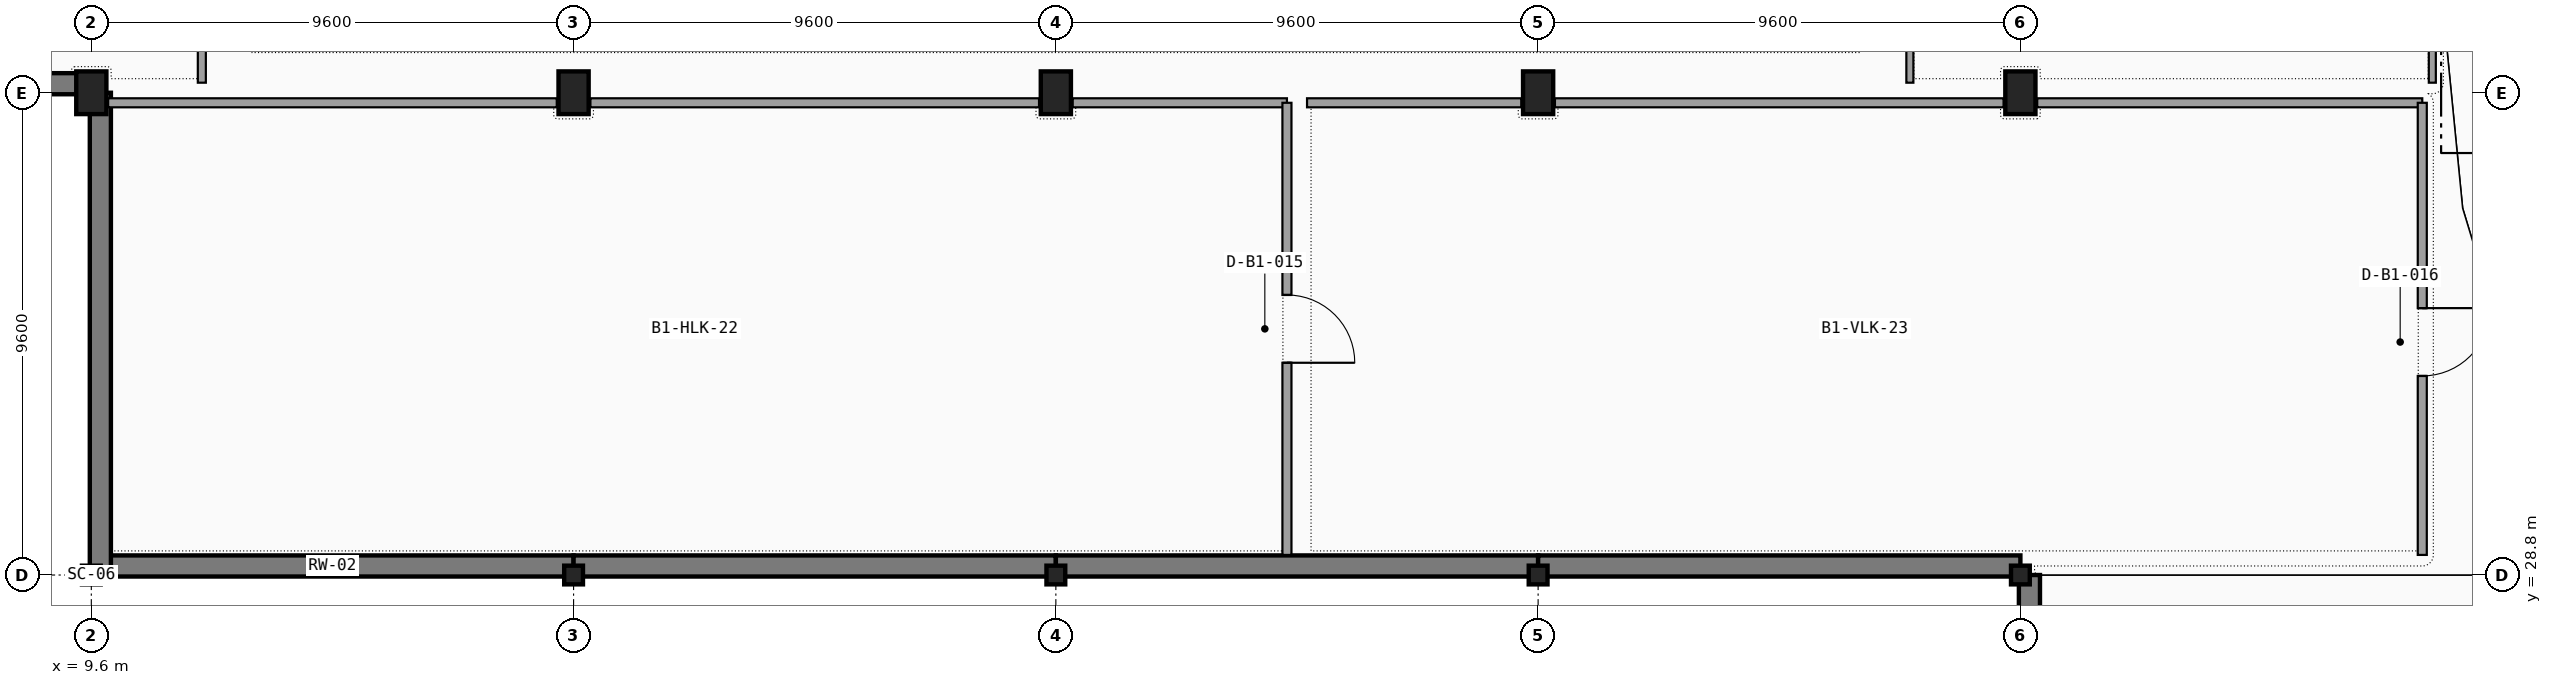
"""IFC4 building model, lengths in metres.
Left out: names, types, materials, properties, quantities, classifications, styles, units other than length and angle.
Written with IfcOpenShell. Run it as: python <this file> out.ifc"""

import sys

from ifc_helpers import new_model, si_unit, direction, frame, frame_2d, origin, origin_2d, place, context, subcontext, project, spatial, rectangle, i_section, extrude, element, fill, save


model = new_model("IFC4")
c1 = context("Model", 3, precision=1e-05, world=origin(), true_north=direction((0.0, 1.0)))
c2 = subcontext(c1, "Body", "Model", "MODEL_VIEW")
j1 = project(units=[si_unit("LENGTHUNIT", "METRE"), si_unit("PLANEANGLEUNIT", "RADIAN")], contexts=[c1])
p1 = place(None, origin())
s1 = spatial("IfcSite", under=j1, at=p1, CompositionType="ELEMENT")
p2 = place(p1, origin())
s2 = spatial("IfcBuilding", under=s1, at=p2, CompositionType="ELEMENT")
p3 = place(p2, frame((0.0, 0.0, -4.8)))
s3 = spatial("IfcBuildingStorey", under=s2, at=p3, CompositionType="ELEMENT", Elevation=-4.8)
p4 = place(p3, frame((9.6, 28.8, 0.0), z_axis=(0.0, 0.0, 1.0), x_axis=(1.0, 0.0, 0.0)))
e1 = element("IfcColumn", 1, at=p4, inside=s3, PredefinedType="COLUMN", context=c2, shape_type="SweptSolid", body=[
    extrude(i_section(OverallWidth=0.374, OverallDepth=0.372, WebThickness=0.016, FlangeThickness=0.026, FilletRadius=0.015, at=origin_2d()), origin(), (0.0, 0.0, 1.0), 4.8),
])
p5 = place(p3, frame((9.6, 38.4, 0.0), z_axis=(0.0, 0.0, 1.0), x_axis=(1.0, 0.0, 0.0)))
e2 = element("IfcColumn", 2, at=p5, inside=s3, PredefinedType="COLUMN", context=c2, shape_type="SweptSolid", body=[
    extrude(rectangle(XDim=0.6, YDim=0.85, at=origin_2d()), origin(), (0.0, 0.0, 1.0), 4.8),
])
p6 = place(p3, frame((19.2, 28.8, 0.0), z_axis=(0.0, 0.0, 1.0), x_axis=(1.0, 0.0, 0.0)))
e3 = element("IfcColumn", 3, at=p6, inside=s3, PredefinedType="COLUMN", context=c2, shape_type="SweptSolid", body=[
    extrude(i_section(OverallWidth=0.374, OverallDepth=0.372, WebThickness=0.016, FlangeThickness=0.026, FilletRadius=0.015, at=origin_2d()), origin(), (0.0, 0.0, 1.0), 4.8),
])
p7 = place(p3, frame((19.2, 38.4, 0.0), z_axis=(0.0, 0.0, 1.0), x_axis=(1.0, 0.0, 0.0)))
e4 = element("IfcColumn", 4, at=p7, inside=s3, PredefinedType="COLUMN", context=c2, shape_type="SweptSolid", body=[
    extrude(rectangle(XDim=0.6, YDim=0.85, at=origin_2d()), origin(), (0.0, 0.0, 1.0), 4.8),
])
p8 = place(p3, frame((28.8, 28.8, 0.0), z_axis=(0.0, 0.0, 1.0), x_axis=(1.0, 0.0, 0.0)))
e5 = element("IfcColumn", 5, at=p8, inside=s3, PredefinedType="COLUMN", context=c2, shape_type="SweptSolid", body=[
    extrude(i_section(OverallWidth=0.374, OverallDepth=0.372, WebThickness=0.016, FlangeThickness=0.026, FilletRadius=0.015, at=origin_2d()), origin(), (0.0, 0.0, 1.0), 4.8),
])
p9 = place(p3, frame((28.8, 38.4, 0.0), z_axis=(0.0, 0.0, 1.0), x_axis=(1.0, 0.0, 0.0)))
e6 = element("IfcColumn", 6, at=p9, inside=s3, PredefinedType="COLUMN", context=c2, shape_type="SweptSolid", body=[
    extrude(rectangle(XDim=0.6, YDim=0.85, at=origin_2d()), origin(), (0.0, 0.0, 1.0), 4.8),
])
p10 = place(p3, frame((38.4, 28.8, 0.0), z_axis=(0.0, 0.0, 1.0), x_axis=(1.0, 0.0, 0.0)))
e7 = element("IfcColumn", 7, at=p10, inside=s3, PredefinedType="COLUMN", context=c2, shape_type="SweptSolid", body=[
    extrude(i_section(OverallWidth=0.374, OverallDepth=0.372, WebThickness=0.016, FlangeThickness=0.026, FilletRadius=0.015, at=origin_2d()), origin(), (0.0, 0.0, 1.0), 4.8),
])
p11 = place(p3, frame((38.4, 38.4, 0.0), z_axis=(0.0, 0.0, 1.0), x_axis=(1.0, 0.0, 0.0)))
e8 = element("IfcColumn", 8, at=p11, inside=s3, PredefinedType="COLUMN", context=c2, shape_type="SweptSolid", body=[
    extrude(rectangle(XDim=0.6, YDim=0.85, at=origin_2d()), origin(), (0.0, 0.0, 1.0), 4.8),
])
p12 = place(p3, frame((48.0, 28.8, 0.0), z_axis=(0.0, 0.0, 1.0), x_axis=(1.0, 0.0, 0.0)))
e9 = element("IfcColumn", 9, at=p12, inside=s3, PredefinedType="COLUMN", context=c2, shape_type="SweptSolid", body=[
    extrude(i_section(OverallWidth=0.374, OverallDepth=0.372, WebThickness=0.016, FlangeThickness=0.026, FilletRadius=0.015, at=origin_2d()), origin(), (0.0, 0.0, 1.0), 4.8),
])
p13 = place(p3, frame((48.0, 38.4, 0.0), z_axis=(0.0, 0.0, 1.0), x_axis=(1.0, 0.0, 0.0)))
e10 = element("IfcColumn", 10, at=p13, inside=s3, PredefinedType="COLUMN", context=c2, shape_type="SweptSolid", body=[
    extrude(rectangle(XDim=0.6, YDim=0.85, at=origin_2d()), origin(), (0.0, 0.0, 1.0), 4.8),
])
p14 = place(p3, frame((9.6, 28.98, 0.0), z_axis=(0.0, 0.0, 1.0), x_axis=(1.0, 0.0, 0.0)))
e11 = element("IfcWall", 11, at=p14, inside=s3, PredefinedType="USERDEFINED", context=c2, shape_type="SweptSolid", body=[
    extrude(rectangle(XDim=9.6, YDim=0.42, at=frame_2d((4.8, 0.0))), origin(), (0.0, 0.0, 1.0), 3.6),
])
p15 = place(p3, frame((19.2, 28.98, 0.0), z_axis=(0.0, 0.0, 1.0), x_axis=(1.0, 0.0, 0.0)))
e12 = element("IfcWall", 12, at=p15, inside=s3, PredefinedType="USERDEFINED", context=c2, shape_type="SweptSolid", body=[
    extrude(rectangle(XDim=9.6, YDim=0.42, at=frame_2d((4.8, 0.0))), origin(), (0.0, 0.0, 1.0), 3.6),
])
p16 = place(p3, frame((28.8, 28.98, 0.0), z_axis=(0.0, 0.0, 1.0), x_axis=(1.0, 0.0, 0.0)))
e13 = element("IfcWall", 13, at=p16, inside=s3, PredefinedType="USERDEFINED", context=c2, shape_type="SweptSolid", body=[
    extrude(rectangle(XDim=9.6, YDim=0.42, at=frame_2d((4.8, 0.0))), origin(), (0.0, 0.0, 1.0), 3.6),
])
for number, where, z_axis, x_axis in (
    (14, (38.4, 28.98, 0.0), (0.0, 0.0, 1.0), (1.0, 0.0, 0.0)),
    (15, (48.18, 28.8, 0.0), (0.0, 0.0, 1.0), (0.0, -1.0, 0.0)),
):
    element("IfcWall", number, at=place(p3, frame(where, z_axis=z_axis, x_axis=x_axis)), inside=s3, PredefinedType="USERDEFINED", context=c2, shape_type="SweptSolid", body=[
        extrude(rectangle(XDim=9.6, YDim=0.42, at=frame_2d((4.8, 0.0))), origin(), (0.0, 0.0, 1.0), 3.6),
    ])
p17 = place(p3, frame((0.28, 38.58, 0.0), z_axis=(0.0, 0.0, 1.0), x_axis=(1.0, 0.0, 0.0)))
e16 = element("IfcWall", 16, at=p17, inside=s3, PredefinedType="USERDEFINED", context=c2, shape_type="SweptSolid", body=[
    extrude(rectangle(XDim=9.04, YDim=0.42, at=frame_2d((4.52, 0.0))), origin(), (0.0, 0.0, 1.0), 3.6),
])
p18 = place(p3, frame((9.78, 38.4, 0.0), z_axis=(0.0, 0.0, 1.0), x_axis=(0.0, -1.0, 0.0)))
e17 = element("IfcWall", 17, at=p18, inside=s3, PredefinedType="USERDEFINED", context=c2, shape_type="SweptSolid", body=[
    extrude(rectangle(XDim=9.6, YDim=0.42, at=frame_2d((4.8, 0.0))), origin(), (0.0, 0.0, 1.0), 3.6),
])
p19 = place(p3, frame((9.935, 38.2, 0.0), z_axis=(0.0, 0.0, 1.0), x_axis=(1.0, 0.0, 0.0)))
e18 = element("IfcWall", 18, at=p19, inside=s3, PredefinedType="PARTITIONING", context=c2, shape_type="SweptSolid", body=[
    extrude(rectangle(XDim=8.93, YDim=0.18, at=frame_2d((4.465, 0.0))), origin(), (0.0, 0.0, 1.0), 3.6),
])
p20 = place(p3, frame((19.535, 38.2, 0.0), z_axis=(0.0, 0.0, 1.0), x_axis=(1.0, 0.0, 0.0)))
e19 = element("IfcWall", 19, at=p20, inside=s3, PredefinedType="PARTITIONING", context=c2, shape_type="SweptSolid", body=[
    extrude(rectangle(XDim=8.93, YDim=0.18, at=frame_2d((4.465, 0.0))), origin(), (0.0, 0.0, 1.0), 3.6),
])
p21 = place(p3, frame((29.135, 38.2, 0.0), z_axis=(0.0, 0.0, 1.0), x_axis=(1.0, 0.0, 0.0)))
e20 = element("IfcWall", 20, at=p21, inside=s3, PredefinedType="PARTITIONING", context=c2, shape_type="SweptSolid", body=[
    extrude(rectangle(XDim=4.265, YDim=0.18, at=frame_2d((2.132, 0.0))), origin(), (0.0, 0.0, 1.0), 3.6),
])
p22 = place(p3, frame((33.4, 38.2, 0.0), z_axis=(0.0, 0.0, 1.0), x_axis=(0.0, -1.0, 0.0)))
e21 = element("IfcWall", 21, at=p22, inside=s3, PredefinedType="PARTITIONING", context=c2, shape_type="SweptSolid", body=[
    extrude(rectangle(XDim=9.0, YDim=0.18, at=frame_2d((4.5, 0.0))), origin(), (0.0, 0.0, 1.0), 3.6),
])
p23 = place(p22, frame((3.825, 0.0, 0.0), z_axis=(0.0, 0.0, 1.0), x_axis=(1.0, 0.0, 0.0)))
e22 = element("IfcOpeningElement", 22, at=p23, cuts=e21, PredefinedType="OPENING", context=c2, shape_type="SweptSolid", body=[
    extrude(rectangle(XDim=1.35, YDim=2.25, at=frame_2d((0.675, 1.125))), frame((0.0, 0.1, 0.0), z_axis=(0.0, -1.0, 0.0), x_axis=(1.0, 0.0, 0.0)), (0.0, 0.0, 1.0), 0.2),
])
p24 = place(p3, frame((48.335, 38.2, 0.0), z_axis=(0.0, 0.0, 1.0), x_axis=(1.0, 0.0, 0.0)))
e23 = element("IfcWall", 23, at=p24, inside=s3, PredefinedType="PARTITIONING", context=c2, shape_type="SweptSolid", body=[
    extrude(rectangle(XDim=7.665, YDim=0.18, at=frame_2d((3.833, 0.0))), origin(), (0.0, 0.0, 1.0), 3.6),
])
p25 = place(p3, frame((56.0, 38.2, 0.0), z_axis=(0.0, 0.0, 1.0), x_axis=(0.0, -1.0, 0.0)))
e24 = element("IfcWall", 24, at=p25, inside=s3, PredefinedType="PARTITIONING", context=c2, shape_type="SweptSolid", body=[
    extrude(rectangle(XDim=9.0, YDim=0.18, at=frame_2d((4.5, 0.0))), origin(), (0.0, 0.0, 1.0), 3.6),
])
p26 = place(p25, frame((4.087, 0.0, 0.0), z_axis=(0.0, 0.0, 1.0), x_axis=(1.0, 0.0, 0.0)))
e25 = element("IfcOpeningElement", 25, at=p26, cuts=e24, PredefinedType="OPENING", context=c2, shape_type="SweptSolid", body=[
    extrude(rectangle(XDim=1.35, YDim=2.25, at=frame_2d((0.675, 1.125))), frame((0.0, 0.1, 0.0), z_axis=(0.0, -1.0, 0.0), x_axis=(1.0, 0.0, 0.0)), (0.0, 0.0, 1.0), 0.2),
])
p27 = place(p3, frame((33.8, 38.2, 0.0), z_axis=(0.0, 0.0, 1.0), x_axis=(1.0, 0.0, 0.0)))
e26 = element("IfcWall", 26, at=p27, inside=s3, PredefinedType="PARTITIONING", context=c2, shape_type="SweptSolid", body=[
    extrude(rectangle(XDim=4.265, YDim=0.18, at=frame_2d((2.132, 0.0))), origin(), (0.0, 0.0, 1.0), 3.6),
])
p28 = place(p3, frame((38.735, 38.2, 0.0), z_axis=(0.0, 0.0, 1.0), x_axis=(1.0, 0.0, 0.0)))
e27 = element("IfcWall", 27, at=p28, inside=s3, PredefinedType="PARTITIONING", context=c2, shape_type="SweptSolid", body=[
    extrude(rectangle(XDim=8.93, YDim=0.18, at=frame_2d((4.465, 0.0))), origin(), (0.0, 0.0, 1.0), 3.6),
])
p29 = place(p3, frame((45.8, 38.6, 0.0), z_axis=(0.0, 0.0, 1.0), x_axis=(0.0, 1.0, 0.0)))
e28 = element("IfcWall", 28, at=p29, inside=s3, PredefinedType="PARTITIONING", context=c2, shape_type="SweptSolid", body=[
    extrude(rectangle(XDim=15.4, YDim=0.14, at=frame_2d((7.7, 0.0))), origin(), (0.0, 0.0, 1.0), 3.6),
])
p30 = place(p3, frame((56.2, 54.0, 0.0), z_axis=(0.0, 0.0, 1.0), x_axis=(0.0, -1.0, 0.0)))
e29 = element("IfcWall", 29, at=p30, inside=s3, PredefinedType="PARTITIONING", context=c2, shape_type="SweptSolid", body=[
    extrude(rectangle(XDim=15.4, YDim=0.14, at=frame_2d((7.7, 0.0))), origin(), (0.0, 0.0, 1.0), 3.6),
])
p31 = place(p30, frame((1.807, 0.0, 0.0), z_axis=(0.0, 0.0, 1.0), x_axis=(1.0, 0.0, 0.0)))
e30 = element("IfcOpeningElement", 30, at=p31, cuts=e29, PredefinedType="OPENING", context=c2, shape_type="SweptSolid", body=[
    extrude(rectangle(XDim=1.0, YDim=2.2, at=frame_2d((0.5, 1.1))), frame((0.0, 0.08, 0.0), z_axis=(0.0, -1.0, 0.0), x_axis=(1.0, 0.0, 0.0)), (0.0, 0.0, 1.0), 0.16),
])
p32 = place(p3, frame((11.8, 48.4, 0.0), z_axis=(0.0, 0.0, 1.0), x_axis=(0.0, -1.0, 0.0)))
e31 = element("IfcWall", 31, at=p32, inside=s3, PredefinedType="PARTITIONING", context=c2, shape_type="SweptSolid", body=[
    extrude(rectangle(XDim=9.8, YDim=0.16, at=frame_2d((4.9, 0.0))), origin(), (0.0, 0.0, 1.0), 3.6),
])
p33 = place(p32, frame((4.44, 0.0, 0.0), z_axis=(0.0, 0.0, 1.0), x_axis=(1.0, 0.0, 0.0)))
e32 = element("IfcOpeningElement", 32, at=p33, cuts=e31, PredefinedType="OPENING", context=c2, shape_type="SweptSolid", body=[
    extrude(rectangle(XDim=0.92, YDim=2.12, at=frame_2d((0.46, 1.06))), frame((0.0, 0.09, 0.0), z_axis=(0.0, -1.0, 0.0), x_axis=(1.0, 0.0, 0.0)), (0.0, 0.0, 1.0), 0.18),
])
p34 = place(p23, origin())
e33 = element("IfcDoor", 33, at=p34, inside=s3, OperationType="SINGLE_SWING_RIGHT", PredefinedType="DOOR", context=c2, shape_type="SweptSolid", body=[
    extrude(rectangle(XDim=1.35, YDim=2.25, at=frame_2d((0.675, 1.125))), frame((0.0, 0.025, 0.0), z_axis=(0.0, -1.0, 0.0), x_axis=(1.0, 0.0, 0.0)), (0.0, 0.0, 1.0), 0.05),
])
fill(e22, e33)
p35 = place(p26, origin())
e34 = element("IfcDoor", 34, at=p35, inside=s3, OperationType="SINGLE_SWING_LEFT", PredefinedType="DOOR", context=c2, shape_type="SweptSolid", body=[
    extrude(rectangle(XDim=1.35, YDim=2.25, at=frame_2d((0.675, 1.125))), frame((0.0, 0.025, 0.0), z_axis=(0.0, -1.0, 0.0), x_axis=(1.0, 0.0, 0.0)), (0.0, 0.0, 1.0), 0.05),
])
fill(e25, e34)
save(model, sys.argv[1])
